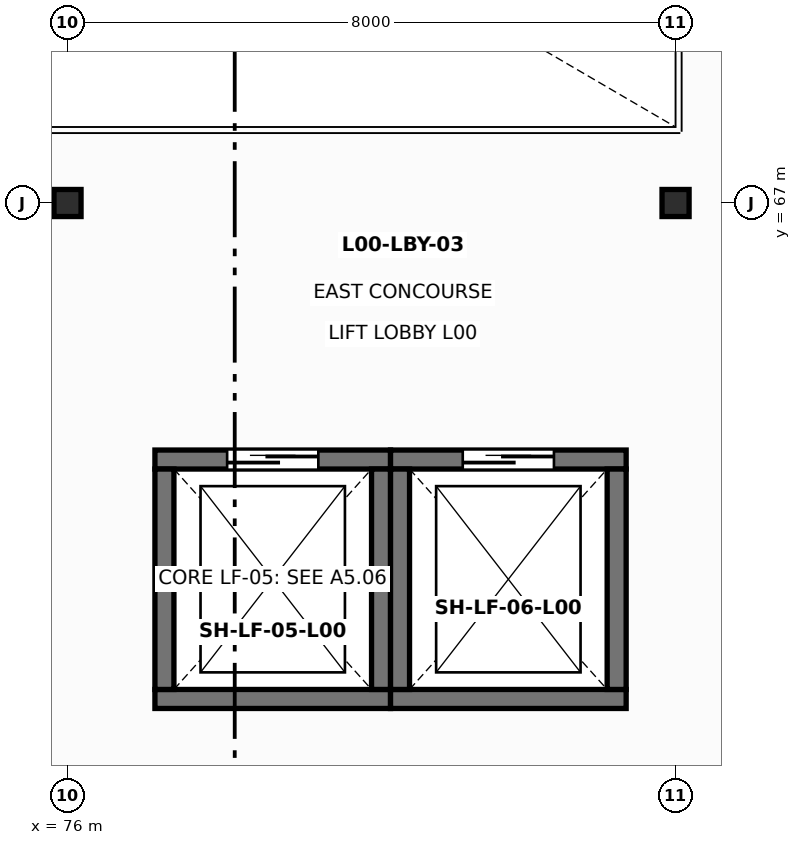
"""IFC4 building model, lengths in metres.
Left out: names, types, materials, properties, quantities, classifications, styles, units other than length and angle.
Written with IfcOpenShell. Run it as: python <this file> out.ifc"""

import sys

from ifc_helpers import new_model, si_unit, direction, frame, frame_2d, origin, origin_2d, place, context, subcontext, project, spatial, rectangle, hollow_rectangle, extrude, element, fill, save


model = new_model("IFC4")
c1 = context("Model", 3, precision=1e-05, world=origin(), true_north=direction((0.0, 1.0)))
c2 = subcontext(c1, "Body", "Model", "MODEL_VIEW")
j1 = project(units=[si_unit("LENGTHUNIT", "METRE"), si_unit("PLANEANGLEUNIT", "RADIAN")], contexts=[c1])
p1 = place(None, origin())
s1 = spatial("IfcSite", under=j1, at=p1, CompositionType="ELEMENT")
p2 = place(p1, origin())
s2 = spatial("IfcBuilding", under=s1, at=p2, CompositionType="ELEMENT")
p3 = place(p2, origin())
s3 = spatial("IfcBuildingStorey", under=s2, at=p3, CompositionType="ELEMENT", Elevation=0.0)
for number, where, z_axis, x_axis in (
    (1, (76.0, 67.0, 0.0), (0.0, 0.0, 1.0), (1.0, 0.0, 0.0)),
    (2, (84.0, 67.0, 0.0), (0.0, 0.0, 1.0), (1.0, 0.0, 0.0)),
):
    element("IfcColumn", number, at=place(p3, frame(where, z_axis=z_axis, x_axis=x_axis)), inside=s3, PredefinedType="COLUMN", context=c2, shape_type="SweptSolid", body=[
        extrude(hollow_rectangle(XDim=0.356, YDim=0.356, WallThickness=0.015, at=origin_2d()), origin(), (0.0, 0.0, 1.0), 6.0),
    ])
p4 = place(p3, frame((77.15, 60.475, 0.0), z_axis=(0.0, 0.0, 1.0), x_axis=(1.0, 0.0, 0.0)))
e3 = element("IfcWall", 3, at=p4, inside=s3, PredefinedType="SOLIDWALL", context=c2, shape_type="SweptSolid", body=[
    extrude(rectangle(XDim=3.1, YDim=0.25, at=frame_2d((1.55, 0.0))), origin(), (0.0, 0.0, 1.0), 5.755),
])
p5 = place(p3, frame((80.25, 63.625, 0.0), z_axis=(0.0, 0.0, 1.0), x_axis=(-1.0, 0.0, 0.0)))
e4 = element("IfcWall", 4, at=p5, inside=s3, PredefinedType="SOLIDWALL", context=c2, shape_type="SweptSolid", body=[
    extrude(rectangle(XDim=3.1, YDim=0.25, at=frame_2d((1.55, 0.0))), origin(), (0.0, 0.0, 1.0), 5.755),
])
p6 = place(p5, frame((0.95, 0.0, 0.0)))
e5 = element("IfcOpeningElement", 5, at=p6, cuts=e4, PredefinedType="OPENING", context=c2, shape_type="SweptSolid", body=[
    extrude(rectangle(XDim=1.2, YDim=2.2, at=frame_2d((0.6, 1.1))), frame((0.0, 0.135, 0.0), z_axis=(0.0, -1.0, 0.0), x_axis=(1.0, 0.0, 0.0)), (0.0, 0.0, 1.0), 0.27),
])
for number, where, z_axis, x_axis in (
    (6, (80.125, 60.6, 0.0), (0.0, 0.0, 1.0), (0.0, 1.0, 0.0)),
    (7, (77.275, 63.5, 0.0), (0.0, 0.0, 1.0), (0.0, -1.0, 0.0)),
):
    element("IfcWall", number, at=place(p3, frame(where, z_axis=z_axis, x_axis=x_axis)), inside=s3, PredefinedType="SOLIDWALL", context=c2, shape_type="SweptSolid", body=[
        extrude(rectangle(XDim=2.9, YDim=0.25, at=frame_2d((1.45, 0.0))), origin(), (0.0, 0.0, 1.0), 5.755),
    ])
p7 = place(p3, frame((80.25, 60.475, 0.0), z_axis=(0.0, 0.0, 1.0), x_axis=(1.0, 0.0, 0.0)))
e8 = element("IfcWall", 8, at=p7, inside=s3, PredefinedType="SOLIDWALL", context=c2, shape_type="SweptSolid", body=[
    extrude(rectangle(XDim=3.1, YDim=0.25, at=frame_2d((1.55, 0.0))), origin(), (0.0, 0.0, 1.0), 5.755),
])
p8 = place(p3, frame((83.35, 63.625, 0.0), z_axis=(0.0, 0.0, 1.0), x_axis=(-1.0, 0.0, 0.0)))
e9 = element("IfcWall", 9, at=p8, inside=s3, PredefinedType="SOLIDWALL", context=c2, shape_type="SweptSolid", body=[
    extrude(rectangle(XDim=3.1, YDim=0.25, at=frame_2d((1.55, 0.0))), origin(), (0.0, 0.0, 1.0), 5.755),
])
p9 = place(p8, frame((0.95, 0.0, 0.0)))
e10 = element("IfcOpeningElement", 10, at=p9, cuts=e9, PredefinedType="OPENING", context=c2, shape_type="SweptSolid", body=[
    extrude(rectangle(XDim=1.2, YDim=2.2, at=frame_2d((0.6, 1.1))), frame((0.0, 0.135, 0.0), z_axis=(0.0, -1.0, 0.0), x_axis=(1.0, 0.0, 0.0)), (0.0, 0.0, 1.0), 0.27),
])
for number, where, z_axis, x_axis in (
    (11, (83.225, 60.6, 0.0), (0.0, 0.0, 1.0), (0.0, 1.0, 0.0)),
    (12, (80.375, 63.5, 0.0), (0.0, 0.0, 1.0), (0.0, -1.0, 0.0)),
):
    element("IfcWall", number, at=place(p3, frame(where, z_axis=z_axis, x_axis=x_axis)), inside=s3, PredefinedType="SOLIDWALL", context=c2, shape_type="SweptSolid", body=[
        extrude(rectangle(XDim=2.9, YDim=0.25, at=frame_2d((1.45, 0.0))), origin(), (0.0, 0.0, 1.0), 5.755),
    ])
p10 = place(p6, frame((1.2, 0.0, 0.0), z_axis=(0.0, 0.0, 1.0), x_axis=(-1.0, 0.0, 0.0)))
e13 = element("IfcDoor", 13, at=p10, inside=s3, OperationType="DOUBLE_DOOR_SLIDING", PredefinedType="DOOR", context=c2, shape_type="SweptSolid", body=[
    extrude(rectangle(XDim=1.2, YDim=2.2, at=frame_2d((0.6, 1.1))), frame((0.0, 0.025, 0.0), z_axis=(0.0, -1.0, 0.0), x_axis=(1.0, 0.0, 0.0)), (0.0, 0.0, 1.0), 0.05),
])
fill(e5, e13)
p11 = place(p9, frame((1.2, 0.0, 0.0), z_axis=(0.0, 0.0, 1.0), x_axis=(-1.0, 0.0, 0.0)))
e14 = element("IfcDoor", 14, at=p11, inside=s3, OperationType="DOUBLE_DOOR_SLIDING", PredefinedType="DOOR", context=c2, shape_type="SweptSolid", body=[
    extrude(rectangle(XDim=1.2, YDim=2.2, at=frame_2d((0.6, 1.1))), frame((0.0, 0.025, 0.0), z_axis=(0.0, -1.0, 0.0), x_axis=(1.0, 0.0, 0.0)), (0.0, 0.0, 1.0), 0.05),
])
fill(e10, e14)
save(model, sys.argv[1])
